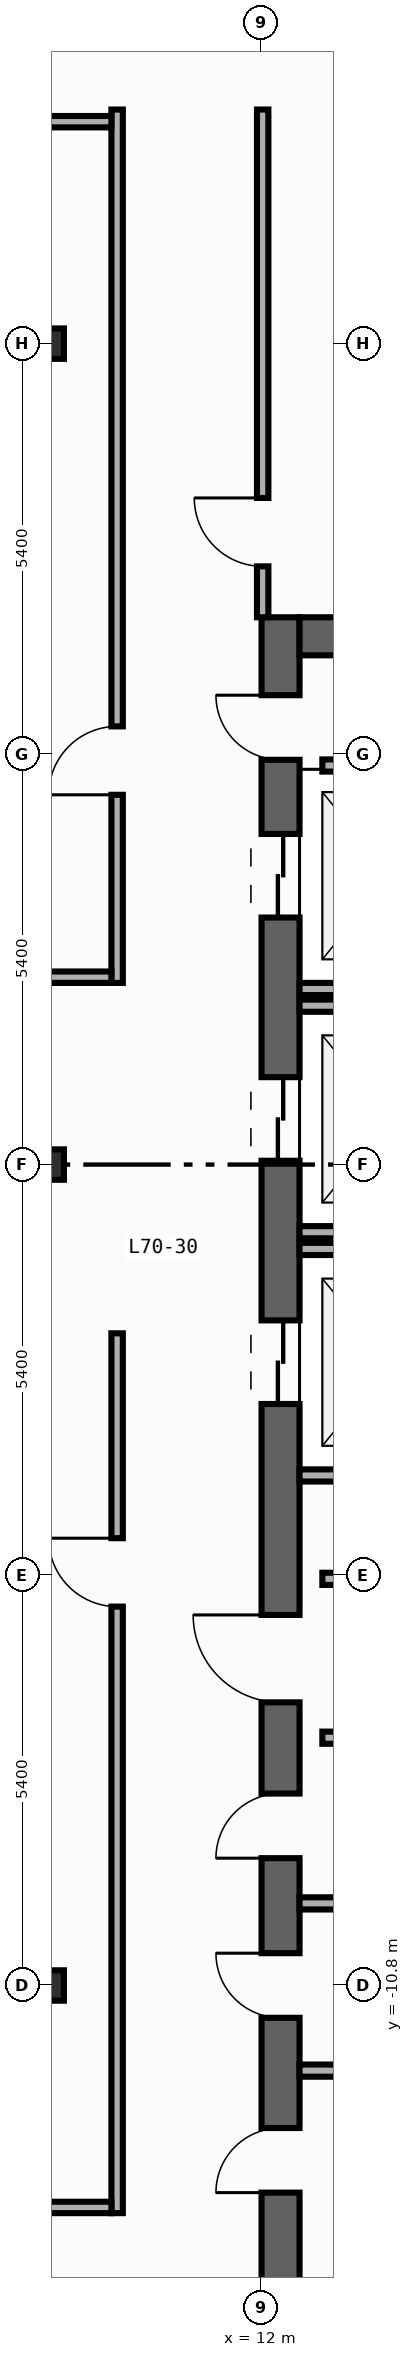
"""IFC4 building model, lengths in metres.
Left out: names, types, materials, properties, quantities, classifications, styles, units other than length and angle.
Written with IfcOpenShell. Run it as: python <this file> out.ifc"""

import sys

from ifc_helpers import new_model, si_unit, direction, frame, frame_2d, origin, origin_2d, place, context, subcontext, project, spatial, rectangle, i_section, extrude, element, fill, save


model = new_model("IFC4")
c1 = context("Model", 3, precision=1e-05, world=origin(), true_north=direction((0.0, 1.0)))
c2 = subcontext(c1, "Body", "Model", "MODEL_VIEW")
j1 = project(units=[si_unit("LENGTHUNIT", "METRE"), si_unit("PLANEANGLEUNIT", "RADIAN")], contexts=[c1])
p1 = place(None, origin())
s1 = spatial("IfcSite", under=j1, at=p1, CompositionType="ELEMENT")
p2 = place(p1, origin())
s2 = spatial("IfcBuilding", under=s1, at=p2, CompositionType="ELEMENT")
p3 = place(p2, frame((0.0, 0.0, 292.8)))
s3 = spatial("IfcBuildingStorey", under=s2, at=p3, CompositionType="ELEMENT", Elevation=292.8)
p4 = place(p3, frame((12.25, -19.8, 0.0), z_axis=(0.0, 0.0, 1.0), x_axis=(0.0, 1.0, 0.0)))
e1 = element("IfcWall", 1, at=p4, inside=s3, PredefinedType="SHEAR", context=c2, shape_type="SweptSolid", body=[
    extrude(rectangle(XDim=27.0, YDim=0.5, at=frame_2d((13.5, 0.0))), origin(), (0.0, 0.0, 1.0), 3.54),
])
p5 = place(p4, frame((23.05, 0.0, 0.0)))
e2 = element("IfcOpeningElement", 2, at=p5, cuts=e1, PredefinedType="OPENING", context=c2, shape_type="SweptSolid", body=[
    extrude(rectangle(XDim=1.1, YDim=2.2, at=frame_2d((0.55, 1.1))), frame((0.0, 0.26, 0.0), z_axis=(0.0, -1.0, 0.0), x_axis=(1.0, 0.0, 0.0)), (0.0, 0.0, 1.0), 0.52),
])
p6 = place(p4, frame((19.85, 0.0, 0.0)))
e3 = element("IfcOpeningElement", 3, at=p6, cuts=e1, PredefinedType="OPENING", context=c2, shape_type="SweptSolid", body=[
    extrude(rectangle(XDim=1.1, YDim=2.2, at=frame_2d((0.55, 1.1))), frame((0.0, 0.26, 0.0), z_axis=(0.0, -1.0, 0.0), x_axis=(1.0, 0.0, 0.0)), (0.0, 0.0, 1.0), 0.52),
])
p7 = place(p4, frame((16.65, 0.0, 0.0)))
e4 = element("IfcOpeningElement", 4, at=p7, cuts=e1, PredefinedType="OPENING", context=c2, shape_type="SweptSolid", body=[
    extrude(rectangle(XDim=1.1, YDim=2.2, at=frame_2d((0.55, 1.1))), frame((0.0, 0.26, 0.0), z_axis=(0.0, -1.0, 0.0), x_axis=(1.0, 0.0, 0.0)), (0.0, 0.0, 1.0), 0.52),
])
p8 = place(p4, frame((6.275, 0.0, 0.0)))
e5 = element("IfcOpeningElement", 5, at=p8, cuts=e1, PredefinedType="OPENING", context=c2, shape_type="SweptSolid", body=[
    extrude(rectangle(XDim=0.85, YDim=2.1, at=frame_2d((0.425, 1.05))), frame((0.0, 0.26, 0.0), z_axis=(0.0, -1.0, 0.0), x_axis=(1.0, 0.0, 0.0)), (0.0, 0.0, 1.0), 0.52),
])
p9 = place(p4, frame((8.575, 0.0, 0.0)))
e6 = element("IfcOpeningElement", 6, at=p9, cuts=e1, PredefinedType="OPENING", context=c2, shape_type="SweptSolid", body=[
    extrude(rectangle(XDim=0.85, YDim=2.1, at=frame_2d((0.425, 1.05))), frame((0.0, 0.26, 0.0), z_axis=(0.0, -1.0, 0.0), x_axis=(1.0, 0.0, 0.0)), (0.0, 0.0, 1.0), 0.52),
])
p10 = place(p4, frame((10.675, 0.0, 0.0)))
e7 = element("IfcOpeningElement", 7, at=p10, cuts=e1, PredefinedType="OPENING", context=c2, shape_type="SweptSolid", body=[
    extrude(rectangle(XDim=0.85, YDim=2.1, at=frame_2d((0.425, 1.05))), frame((0.0, 0.26, 0.0), z_axis=(0.0, -1.0, 0.0), x_axis=(1.0, 0.0, 0.0)), (0.0, 0.0, 1.0), 0.52),
])
p11 = place(p4, frame((12.725, 0.0, 0.0)))
e8 = element("IfcOpeningElement", 8, at=p11, cuts=e1, PredefinedType="OPENING", context=c2, shape_type="SweptSolid", body=[
    extrude(rectangle(XDim=1.15, YDim=2.2, at=frame_2d((0.575, 1.1))), frame((0.0, 0.26, 0.0), z_axis=(0.0, -1.0, 0.0), x_axis=(1.0, 0.0, 0.0)), (0.0, 0.0, 1.0), 0.52),
])
p12 = place(p4, frame((25.125, 0.0, 0.0)))
e9 = element("IfcOpeningElement", 9, at=p12, cuts=e1, PredefinedType="OPENING", context=c2, shape_type="SweptSolid", body=[
    extrude(rectangle(XDim=0.85, YDim=2.1, at=frame_2d((0.425, 1.05))), frame((0.0, 0.26, 0.0), z_axis=(0.0, -1.0, 0.0), x_axis=(1.0, 0.0, 0.0)), (0.0, 0.0, 1.0), 0.52),
])
p13 = place(p3, frame((12.5, 6.95, 0.0), z_axis=(0.0, 0.0, 1.0), x_axis=(1.0, 0.0, 0.0)))
e10 = element("IfcWall", 10, at=p13, inside=s3, PredefinedType="SHEAR", context=c2, shape_type="SweptSolid", body=[
    extrude(rectangle(XDim=7.4, YDim=0.5, at=frame_2d((3.7, 0.0))), origin(), (0.0, 0.0, 1.0), 3.54),
])
for number, where, z_axis, x_axis in (
    (11, (9.2, -10.8, 0.0), (0.0, 0.0, 1.0), (1.0, 0.0, 0.0)),
    (12, (9.2, 0.0, 0.0), (0.0, 0.0, 1.0), (1.0, 0.0, 0.0)),
    (13, (9.2, 10.8, 0.0), (0.0, 0.0, 1.0), (1.0, 0.0, 0.0)),
):
    element("IfcColumn", number, at=place(p3, frame(where, z_axis=z_axis, x_axis=x_axis)), inside=s3, PredefinedType="COLUMN", context=c2, shape_type="SweptSolid", body=[
        extrude(i_section(OverallWidth=0.4, OverallDepth=0.4, WebThickness=0.013, FlangeThickness=0.021, FilletRadius=0.022, at=origin_2d()), origin(), (0.0, 0.0, 1.0), 3.8),
    ])
for number, where, z_axis, x_axis in (
    (14, (12.5, 2.31, 0.0), (0.0, 0.0, 1.0), (1.0, 0.0, 0.0)),
    (15, (12.5, -0.89, 0.0), (0.0, 0.0, 1.0), (1.0, 0.0, 0.0)),
    (16, (12.5, 2.09, 0.0), (0.0, 0.0, 1.0), (1.0, 0.0, 0.0)),
    (17, (12.5, -4.09, 0.0), (0.0, 0.0, 1.0), (1.0, 0.0, 0.0)),
    (18, (12.5, -1.11, 0.0), (0.0, 0.0, 1.0), (1.0, 0.0, 0.0)),
):
    element("IfcWall", number, at=place(p3, frame(where, z_axis=z_axis, x_axis=x_axis)), inside=s3, PredefinedType="STANDARD", context=c2, shape_type="SweptSolid", body=[
        extrude(rectangle(XDim=2.49, YDim=0.16, at=frame_2d((1.245, 0.0))), origin(), (0.0, 0.0, 1.0), 3.54),
    ])
for number, where, z_axis, x_axis in (
    (19, (12.8, -5.45, 0.0), (0.0, 0.0, 1.0), (1.0, 0.0, 0.0)),
    (20, (12.8, -7.54, 0.0), (0.0, 0.0, 1.0), (1.0, 0.0, 0.0)),
    (21, (12.8, 5.25, 0.0), (0.0, 0.0, 1.0), (1.0, 0.0, 0.0)),
):
    element("IfcWall", number, at=place(p3, frame(where, z_axis=z_axis, x_axis=x_axis)), inside=s3, PredefinedType="STANDARD", context=c2, shape_type="SweptSolid", body=[
        extrude(rectangle(XDim=2.6, YDim=0.16, at=frame_2d((1.3, 0.0))), origin(), (0.0, 0.0, 1.0), 3.54),
    ])
for number, where, z_axis, x_axis in (
    (22, (12.5, -11.92, 0.0), (0.0, 0.0, 1.0), (1.0, 0.0, 0.0)),
    (23, (12.5, -9.72, 0.0), (0.0, 0.0, 1.0), (1.0, 0.0, 0.0)),
):
    element("IfcWall", number, at=place(p3, frame(where, z_axis=z_axis, x_axis=x_axis)), inside=s3, PredefinedType="PARTITIONING", context=c2, shape_type="SweptSolid", body=[
        extrude(rectangle(XDim=2.9, YDim=0.16, at=frame_2d((1.45, 0.0))), origin(), (0.0, 0.0, 1.0), 3.54),
    ])
p14 = place(p3, frame((12.015, 7.2, 0.0), z_axis=(0.0, 0.0, 1.0), x_axis=(0.0, 1.0, 0.0)))
e24 = element("IfcWall", 24, at=p14, inside=s3, PredefinedType="PARTITIONING", context=c2, shape_type="SweptSolid", body=[
    extrude(rectangle(XDim=6.68, YDim=0.15, at=frame_2d((3.34, 0.0))), origin(), (0.0, 0.0, 1.0), 3.54),
])
p15 = place(p14, frame((0.67, 0.0, 0.0)))
e25 = element("IfcOpeningElement", 25, at=p15, cuts=e24, PredefinedType="OPENING", context=c2, shape_type="SweptSolid", body=[
    extrude(rectangle(XDim=0.9, YDim=2.15, at=frame_2d((0.45, 1.075))), frame((0.0, 0.085, 0.0), z_axis=(0.0, -1.0, 0.0), x_axis=(1.0, 0.0, 0.0)), (0.0, 0.0, 1.0), 0.17),
])
p16 = place(p3, frame((10.1, 2.39, 0.0), z_axis=(0.0, 0.0, 1.0), x_axis=(0.0, 1.0, 0.0)))
e26 = element("IfcWall", 26, at=p16, inside=s3, PredefinedType="PARTITIONING", context=c2, shape_type="SweptSolid", body=[
    extrude(rectangle(XDim=11.49, YDim=0.15, at=frame_2d((5.745, 0.0))), origin(), (0.0, 0.0, 1.0), 3.54),
])
p17 = place(p16, frame((2.475, 0.0, 0.0)))
e27 = element("IfcOpeningElement", 27, at=p17, cuts=e26, PredefinedType="OPENING", context=c2, shape_type="SweptSolid", body=[
    extrude(rectangle(XDim=0.9, YDim=2.15, at=frame_2d((0.45, 1.075))), frame((0.0, 0.085, 0.0), z_axis=(0.0, -1.0, 0.0), x_axis=(1.0, 0.0, 0.0)), (0.0, 0.0, 1.0), 0.17),
])
p18 = place(p3, frame((10.1, -13.795, 0.0), z_axis=(0.0, 0.0, 1.0), x_axis=(0.0, 1.0, 0.0)))
e28 = element("IfcWall", 28, at=p18, inside=s3, PredefinedType="PARTITIONING", context=c2, shape_type="SweptSolid", body=[
    extrude(rectangle(XDim=11.575, YDim=0.15, at=frame_2d((5.788, 0.0))), origin(), (0.0, 0.0, 1.0), 3.54),
])
p19 = place(p18, frame((7.979, 0.0, 0.0)))
e29 = element("IfcOpeningElement", 29, at=p19, cuts=e28, PredefinedType="OPENING", context=c2, shape_type="SweptSolid", body=[
    extrude(rectangle(XDim=0.9, YDim=2.15, at=frame_2d((0.45, 1.075))), frame((0.0, 0.085, 0.0), z_axis=(0.0, -1.0, 0.0), x_axis=(1.0, 0.0, 0.0)), (0.0, 0.0, 1.0), 0.17),
])
p20 = place(p3, frame((2.77, 2.465, 0.0), z_axis=(0.0, 0.0, 1.0), x_axis=(1.0, 0.0, 0.0)))
e30 = element("IfcWall", 30, at=p20, inside=s3, PredefinedType="PARTITIONING", context=c2, shape_type="SweptSolid", body=[
    extrude(rectangle(XDim=7.255, YDim=0.15, at=frame_2d((3.627, 0.0))), origin(), (0.0, 0.0, 1.0), 3.54),
])
p21 = place(p20, frame((0.46, 0.0, 0.0)))
e31 = element("IfcOpeningElement", 31, at=p21, cuts=e30, PredefinedType="OPENING", context=c2, shape_type="SweptSolid", body=[
    extrude(rectangle(XDim=0.9, YDim=2.15, at=frame_2d((0.45, 1.075))), frame((0.0, 0.085, 0.0), z_axis=(0.0, -1.0, 0.0), x_axis=(1.0, 0.0, 0.0)), (0.0, 0.0, 1.0), 0.17),
])
p22 = place(p3, frame((2.77, 13.72, 0.0), z_axis=(0.0, 0.0, 1.0), x_axis=(1.0, 0.0, 0.0)))
e32 = element("IfcWall", 32, at=p22, inside=s3, PredefinedType="PARTITIONING", context=c2, shape_type="SweptSolid", body=[
    extrude(rectangle(XDim=7.255, YDim=0.15, at=frame_2d((3.627, 0.0))), origin(), (0.0, 0.0, 1.0), 3.54),
])
p23 = place(p22, frame((2.279, 0.0, 0.0)))
e33 = element("IfcOpeningElement", 33, at=p23, cuts=e32, PredefinedType="OPENING", context=c2, shape_type="SweptSolid", body=[
    extrude(rectangle(XDim=0.9, YDim=2.15, at=frame_2d((0.45, 1.075))), frame((0.0, 0.085, 0.0), z_axis=(0.0, -1.0, 0.0), x_axis=(1.0, 0.0, 0.0)), (0.0, 0.0, 1.0), 0.17),
])
p24 = place(p3, frame((2.94, -13.72, 0.0), z_axis=(0.0, 0.0, 1.0), x_axis=(1.0, 0.0, 0.0)))
e34 = element("IfcWall", 34, at=p24, inside=s3, PredefinedType="PARTITIONING", context=c2, shape_type="SweptSolid", body=[
    extrude(rectangle(XDim=7.085, YDim=0.15, at=frame_2d((3.542, 0.0))), origin(), (0.0, 0.0, 1.0), 3.54),
])
p25 = place(p24, frame((2.08, 0.0, 0.0)))
e35 = element("IfcOpeningElement", 35, at=p25, cuts=e34, PredefinedType="OPENING", context=c2, shape_type="SweptSolid", body=[
    extrude(rectangle(XDim=0.9, YDim=2.15, at=frame_2d((0.45, 1.075))), frame((0.0, 0.085, 0.0), z_axis=(0.0, -1.0, 0.0), x_axis=(1.0, 0.0, 0.0)), (0.0, 0.0, 1.0), 0.17),
])
p26 = place(p5, origin())
e36 = element("IfcDoor", 36, at=p26, inside=s3, OperationType="DOUBLE_DOOR_SLIDING", PredefinedType="DOOR", context=c2, shape_type="SweptSolid", body=[
    extrude(rectangle(XDim=1.1, YDim=2.2, at=frame_2d((0.55, 1.1))), frame((0.0, 0.025, 0.0), z_axis=(0.0, -1.0, 0.0), x_axis=(1.0, 0.0, 0.0)), (0.0, 0.0, 1.0), 0.05),
])
fill(e2, e36)
p27 = place(p6, origin())
e37 = element("IfcDoor", 37, at=p27, inside=s3, OperationType="DOUBLE_DOOR_SLIDING", PredefinedType="DOOR", context=c2, shape_type="SweptSolid", body=[
    extrude(rectangle(XDim=1.1, YDim=2.2, at=frame_2d((0.55, 1.1))), frame((0.0, 0.025, 0.0), z_axis=(0.0, -1.0, 0.0), x_axis=(1.0, 0.0, 0.0)), (0.0, 0.0, 1.0), 0.05),
])
fill(e3, e37)
p28 = place(p7, origin())
e38 = element("IfcDoor", 38, at=p28, inside=s3, OperationType="DOUBLE_DOOR_SLIDING", PredefinedType="DOOR", context=c2, shape_type="SweptSolid", body=[
    extrude(rectangle(XDim=1.1, YDim=2.2, at=frame_2d((0.55, 1.1))), frame((0.0, 0.025, 0.0), z_axis=(0.0, -1.0, 0.0), x_axis=(1.0, 0.0, 0.0)), (0.0, 0.0, 1.0), 0.05),
])
fill(e4, e38)
p29 = place(p8, origin())
e39 = element("IfcDoor", 39, at=p29, inside=s3, OperationType="SINGLE_SWING_LEFT", PredefinedType="DOOR", context=c2, shape_type="SweptSolid", body=[
    extrude(rectangle(XDim=0.85, YDim=2.1, at=frame_2d((0.425, 1.05))), frame((0.0, 0.025, 0.0), z_axis=(0.0, -1.0, 0.0), x_axis=(1.0, 0.0, 0.0)), (0.0, 0.0, 1.0), 0.05),
])
fill(e5, e39)
p30 = place(p9, origin())
e40 = element("IfcDoor", 40, at=p30, inside=s3, OperationType="SINGLE_SWING_RIGHT", PredefinedType="DOOR", context=c2, shape_type="SweptSolid", body=[
    extrude(rectangle(XDim=0.85, YDim=2.1, at=frame_2d((0.425, 1.05))), frame((0.0, 0.025, 0.0), z_axis=(0.0, -1.0, 0.0), x_axis=(1.0, 0.0, 0.0)), (0.0, 0.0, 1.0), 0.05),
])
fill(e6, e40)
p31 = place(p10, origin())
e41 = element("IfcDoor", 41, at=p31, inside=s3, OperationType="SINGLE_SWING_LEFT", PredefinedType="DOOR", context=c2, shape_type="SweptSolid", body=[
    extrude(rectangle(XDim=0.85, YDim=2.1, at=frame_2d((0.425, 1.05))), frame((0.0, 0.025, 0.0), z_axis=(0.0, -1.0, 0.0), x_axis=(1.0, 0.0, 0.0)), (0.0, 0.0, 1.0), 0.05),
])
fill(e7, e41)
p32 = place(p11, origin())
e42 = element("IfcDoor", 42, at=p32, inside=s3, OperationType="SINGLE_SWING_RIGHT", PredefinedType="DOOR", context=c2, shape_type="SweptSolid", body=[
    extrude(rectangle(XDim=1.15, YDim=2.2, at=frame_2d((0.575, 1.1))), frame((0.0, 0.025, 0.0), z_axis=(0.0, -1.0, 0.0), x_axis=(1.0, 0.0, 0.0)), (0.0, 0.0, 1.0), 0.05),
])
fill(e8, e42)
p33 = place(p12, origin())
e43 = element("IfcDoor", 43, at=p33, inside=s3, OperationType="SINGLE_SWING_RIGHT", PredefinedType="DOOR", context=c2, shape_type="SweptSolid", body=[
    extrude(rectangle(XDim=0.85, YDim=2.1, at=frame_2d((0.425, 1.05))), frame((0.0, 0.025, 0.0), z_axis=(0.0, -1.0, 0.0), x_axis=(1.0, 0.0, 0.0)), (0.0, 0.0, 1.0), 0.05),
])
fill(e9, e43)
p34 = place(p15, origin())
e44 = element("IfcDoor", 44, at=p34, inside=s3, OperationType="SINGLE_SWING_RIGHT", PredefinedType="DOOR", context=c2, shape_type="SweptSolid", body=[
    extrude(rectangle(XDim=0.9, YDim=2.15, at=frame_2d((0.45, 1.075))), frame((0.0, 0.025, 0.0), z_axis=(0.0, -1.0, 0.0), x_axis=(1.0, 0.0, 0.0)), (0.0, 0.0, 1.0), 0.05),
])
fill(e25, e44)
p35 = place(p17, origin())
e45 = element("IfcDoor", 45, at=p35, inside=s3, OperationType="SINGLE_SWING_LEFT", PredefinedType="DOOR", context=c2, shape_type="SweptSolid", body=[
    extrude(rectangle(XDim=0.9, YDim=2.15, at=frame_2d((0.45, 1.075))), frame((0.0, 0.025, 0.0), z_axis=(0.0, -1.0, 0.0), x_axis=(1.0, 0.0, 0.0)), (0.0, 0.0, 1.0), 0.05),
])
fill(e27, e45)
p36 = place(p19, origin())
e46 = element("IfcDoor", 46, at=p36, inside=s3, OperationType="SINGLE_SWING_RIGHT", PredefinedType="DOOR", context=c2, shape_type="SweptSolid", body=[
    extrude(rectangle(XDim=0.9, YDim=2.15, at=frame_2d((0.45, 1.075))), frame((0.0, 0.025, 0.0), z_axis=(0.0, -1.0, 0.0), x_axis=(1.0, 0.0, 0.0)), (0.0, 0.0, 1.0), 0.05),
])
fill(e29, e46)
save(model, sys.argv[1])
